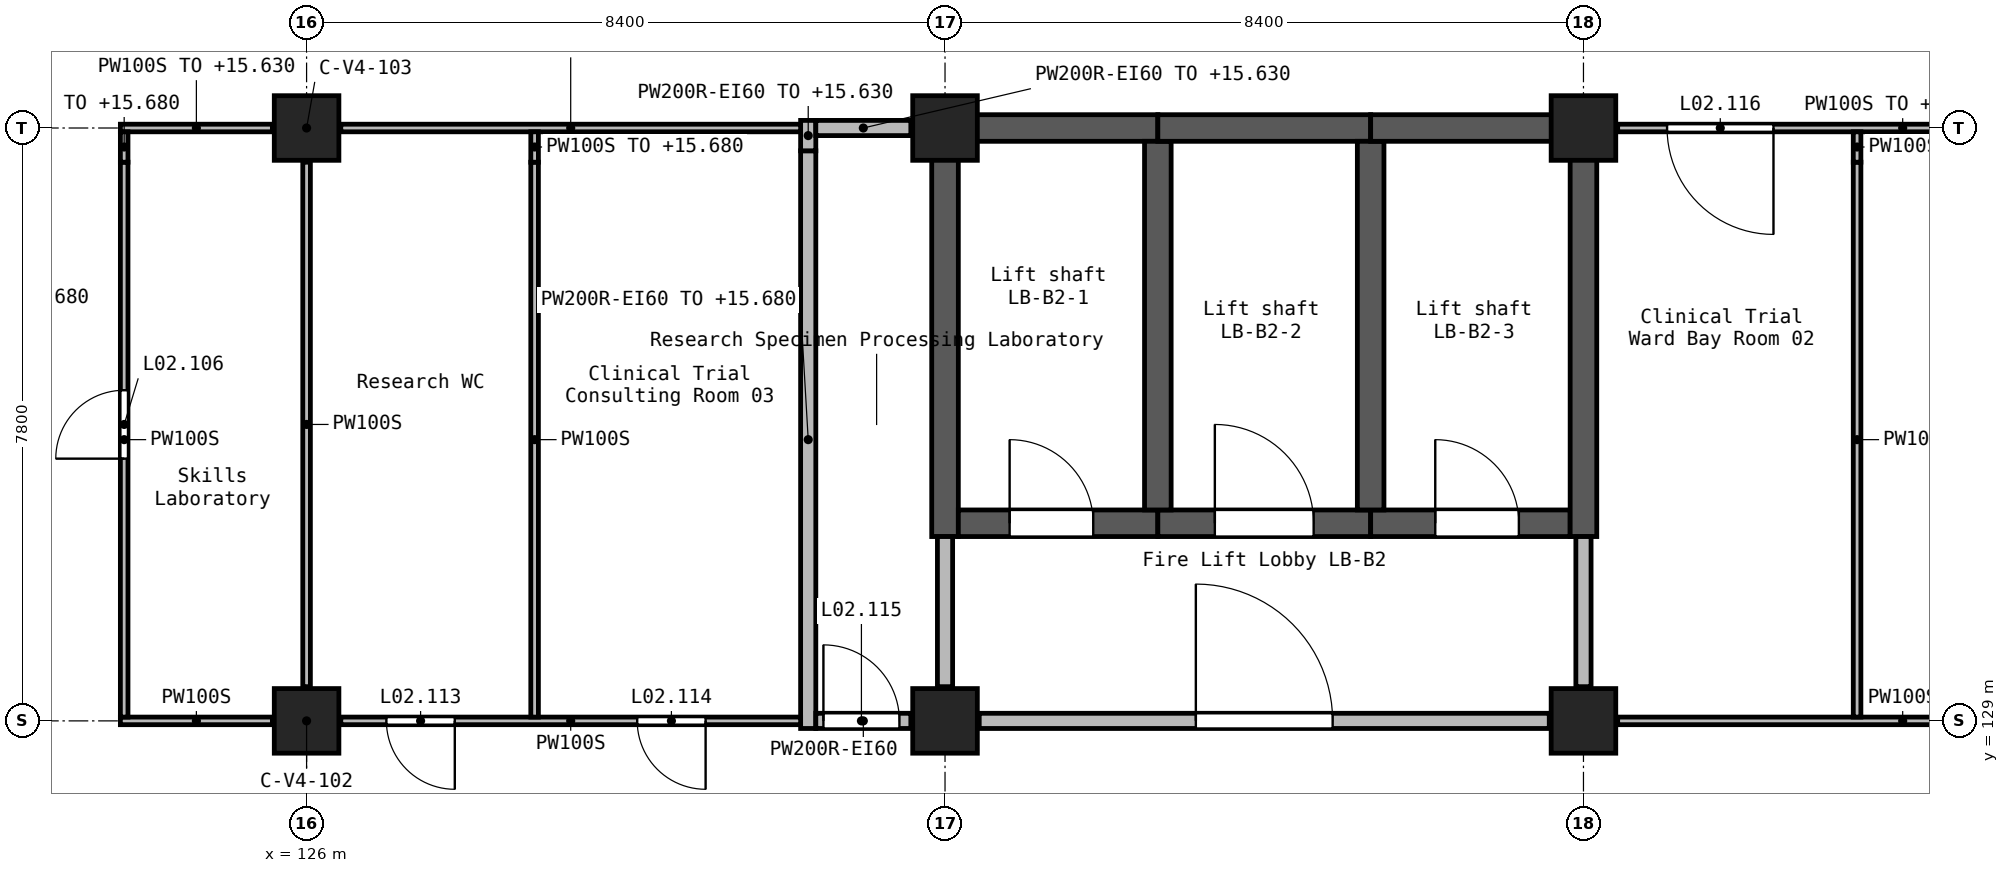
"""IFC4 building model, lengths in metres.
Left out: names, types, materials, properties, quantities, classifications, styles, units other than length and angle.
Written with IfcOpenShell. Run it as: python <this file> out.ifc"""

import sys

from ifc_helpers import new_model, si_unit, direction, frame, frame_2d, origin, origin_2d, place, context, subcontext, project, spatial, rectangle, extrude, element, fill, save


model = new_model("IFC4")
c1 = context("Model", 3, precision=1e-05, world=origin(), true_north=direction((0.0, 1.0)))
c2 = subcontext(c1, "Body", "Model", "MODEL_VIEW")
j1 = project(units=[si_unit("LENGTHUNIT", "METRE"), si_unit("PLANEANGLEUNIT", "RADIAN")], contexts=[c1])
p1 = place(None, origin())
s1 = spatial("IfcSite", under=j1, at=p1, CompositionType="ELEMENT")
p2 = place(p1, origin())
s2 = spatial("IfcBuilding", under=s1, at=p2, CompositionType="ELEMENT")
p3 = place(p2, frame((0.0, 0.0, 12.6)))
s3 = spatial("IfcBuildingStorey", under=s2, at=p3, CompositionType="ELEMENT", Elevation=12.6)
for number, where, z_axis, x_axis in (
    (1, (126.0, 129.0, 0.0), (0.0, 0.0, 1.0), (1.0, 0.0, 0.0)),
    (2, (126.0, 136.8, 0.0), (0.0, 0.0, 1.0), (1.0, 0.0, 0.0)),
    (3, (134.4, 129.0, 0.0), (0.0, 0.0, 1.0), (1.0, 0.0, 0.0)),
    (4, (134.4, 136.8, 0.0), (0.0, 0.0, 1.0), (1.0, 0.0, 0.0)),
    (5, (142.8, 129.0, 0.0), (0.0, 0.0, 1.0), (1.0, 0.0, 0.0)),
    (6, (142.8, 136.8, 0.0), (0.0, 0.0, 1.0), (1.0, 0.0, 0.0)),
):
    element("IfcColumn", number, at=place(p3, frame(where, z_axis=z_axis, x_axis=x_axis)), inside=s3, PredefinedType="COLUMN", context=c2, shape_type="SweptSolid", body=[
        extrude(rectangle(XDim=0.85, YDim=0.85, at=origin_2d()), origin(), (0.0, 0.0, 1.0), 4.2),
    ])
p4 = place(p3, frame((134.225, 136.8, 0.0), z_axis=(0.0, 0.0, 1.0), x_axis=(1.0, 0.0, 0.0)))
e7 = element("IfcWall", 7, at=p4, inside=s3, PredefinedType="SHEAR", context=c2, shape_type="SweptSolid", body=[
    extrude(rectangle(XDim=2.975, YDim=0.35, at=frame_2d((1.487, 0.0))), origin(), (0.0, 0.0, 1.0), 4.2),
])
p5 = place(p3, frame((134.4, 131.425, 0.0), z_axis=(0.0, 0.0, 1.0), x_axis=(0.0, 1.0, 0.0)))
e8 = element("IfcWall", 8, at=p5, inside=s3, PredefinedType="SHEAR", context=c2, shape_type="SweptSolid", body=[
    extrude(rectangle(XDim=5.2, YDim=0.35, at=frame_2d((2.6, 0.0))), origin(), (0.0, 0.0, 1.0), 4.2),
])
p6 = place(p3, frame((134.575, 131.6, 0.0), z_axis=(0.0, 0.0, 1.0), x_axis=(1.0, 0.0, 0.0)))
e9 = element("IfcWall", 9, at=p6, inside=s3, PredefinedType="SHEAR", context=c2, shape_type="SweptSolid", body=[
    extrude(rectangle(XDim=2.625, YDim=0.35, at=frame_2d((1.312, 0.0))), origin(), (0.0, 0.0, 1.0), 4.2),
])
p7 = place(p6, frame((0.675, 0.0, 0.0)))
e10 = element("IfcOpeningElement", 10, at=p7, cuts=e9, PredefinedType="OPENING", context=c2, shape_type="SweptSolid", body=[
    extrude(rectangle(XDim=1.1, YDim=2.1, at=frame_2d((0.55, 1.05))), frame((0.0, 0.185, 0.0), z_axis=(0.0, -1.0, 0.0), x_axis=(1.0, 0.0, 0.0)), (0.0, 0.0, 1.0), 0.37),
])
p8 = place(p3, frame((137.2, 131.6, 0.0), z_axis=(0.0, 0.0, 1.0), x_axis=(1.0, 0.0, 0.0)))
e11 = element("IfcWall", 11, at=p8, inside=s3, PredefinedType="SHEAR", context=c2, shape_type="SweptSolid", body=[
    extrude(rectangle(XDim=2.8, YDim=0.35, at=frame_2d((1.4, 0.0))), origin(), (0.0, 0.0, 1.0), 4.2),
])
p9 = place(p8, frame((0.75, 0.0, 0.0)))
e12 = element("IfcOpeningElement", 12, at=p9, cuts=e11, PredefinedType="OPENING", context=c2, shape_type="SweptSolid", body=[
    extrude(rectangle(XDim=1.3, YDim=2.1, at=frame_2d((0.65, 1.05))), frame((0.0, 0.185, 0.0), z_axis=(0.0, -1.0, 0.0), x_axis=(1.0, 0.0, 0.0)), (0.0, 0.0, 1.0), 0.37),
])
p10 = place(p3, frame((137.2, 131.775, 0.0), z_axis=(0.0, 0.0, 1.0), x_axis=(0.0, 1.0, 0.0)))
e13 = element("IfcWall", 13, at=p10, inside=s3, PredefinedType="SHEAR", context=c2, shape_type="SweptSolid", body=[
    extrude(rectangle(XDim=4.85, YDim=0.35, at=frame_2d((2.425, 0.0))), origin(), (0.0, 0.0, 1.0), 4.2),
])
p11 = place(p3, frame((137.2, 136.8, 0.0), z_axis=(0.0, 0.0, 1.0), x_axis=(1.0, 0.0, 0.0)))
e14 = element("IfcWall", 14, at=p11, inside=s3, PredefinedType="SHEAR", context=c2, shape_type="SweptSolid", body=[
    extrude(rectangle(XDim=2.8, YDim=0.35, at=frame_2d((1.4, 0.0))), origin(), (0.0, 0.0, 1.0), 4.2),
])
p12 = place(p3, frame((140.0, 131.6, 0.0), z_axis=(0.0, 0.0, 1.0), x_axis=(1.0, 0.0, 0.0)))
e15 = element("IfcWall", 15, at=p12, inside=s3, PredefinedType="SHEAR", context=c2, shape_type="SweptSolid", body=[
    extrude(rectangle(XDim=2.625, YDim=0.35, at=frame_2d((1.312, 0.0))), origin(), (0.0, 0.0, 1.0), 4.2),
])
p13 = place(p12, frame((0.85, 0.0, 0.0)))
e16 = element("IfcOpeningElement", 16, at=p13, cuts=e15, PredefinedType="OPENING", context=c2, shape_type="SweptSolid", body=[
    extrude(rectangle(XDim=1.1, YDim=2.1, at=frame_2d((0.55, 1.05))), frame((0.0, 0.185, 0.0), z_axis=(0.0, -1.0, 0.0), x_axis=(1.0, 0.0, 0.0)), (0.0, 0.0, 1.0), 0.37),
])
p14 = place(p3, frame((140.0, 131.775, 0.0), z_axis=(0.0, 0.0, 1.0), x_axis=(0.0, 1.0, 0.0)))
e17 = element("IfcWall", 17, at=p14, inside=s3, PredefinedType="SHEAR", context=c2, shape_type="SweptSolid", body=[
    extrude(rectangle(XDim=4.85, YDim=0.35, at=frame_2d((2.425, 0.0))), origin(), (0.0, 0.0, 1.0), 4.2),
])
p15 = place(p3, frame((140.0, 136.8, 0.0), z_axis=(0.0, 0.0, 1.0), x_axis=(1.0, 0.0, 0.0)))
e18 = element("IfcWall", 18, at=p15, inside=s3, PredefinedType="SHEAR", context=c2, shape_type="SweptSolid", body=[
    extrude(rectangle(XDim=2.625, YDim=0.35, at=frame_2d((1.312, 0.0))), origin(), (0.0, 0.0, 1.0), 4.2),
])
p16 = place(p3, frame((142.8, 131.425, 0.0), z_axis=(0.0, 0.0, 1.0), x_axis=(0.0, 1.0, 0.0)))
e19 = element("IfcWall", 19, at=p16, inside=s3, PredefinedType="SHEAR", context=c2, shape_type="SweptSolid", body=[
    extrude(rectangle(XDim=5.55, YDim=0.35, at=frame_2d((2.775, 0.0))), origin(), (0.0, 0.0, 1.0), 4.2),
])
p17 = place(p3, frame((134.85, 129.0, 0.0), z_axis=(0.0, 0.0, 1.0), x_axis=(1.0, 0.0, 0.0)))
e20 = element("IfcWall", 20, at=p17, inside=s3, PredefinedType="SOLIDWALL", context=c2, shape_type="SweptSolid", body=[
    extrude(rectangle(XDim=7.5, YDim=0.2, at=frame_2d((3.75, 0.0))), origin(), (0.0, 0.0, 1.0), 3.85),
])
p18 = place(p17, frame((2.85, 0.0, 0.0)))
e21 = element("IfcOpeningElement", 21, at=p18, cuts=e20, PredefinedType="OPENING", context=c2, shape_type="SweptSolid", body=[
    extrude(rectangle(XDim=1.8, YDim=2.1, at=frame_2d((0.9, 1.05))), frame((0.0, 0.11, 0.0), z_axis=(0.0, -1.0, 0.0), x_axis=(1.0, 0.0, 0.0)), (0.0, 0.0, 1.0), 0.22),
])
p19 = place(p3, frame((132.6, 128.9, 0.0), z_axis=(0.0, 0.0, 1.0), x_axis=(0.0, 1.0, 0.0)))
e22 = element("IfcWall", 22, at=p19, inside=s3, PredefinedType="SOLIDWALL", context=c2, shape_type="SweptSolid", body=[
    extrude(rectangle(XDim=7.6, YDim=0.2, at=frame_2d((3.8, 0.0))), origin(), (0.0, 0.0, 1.0), 3.08),
])
p20 = place(p3, frame((132.6, 136.5, 0.0), z_axis=(0.0, 0.0, 1.0), x_axis=(0.0, 1.0, 0.0)))
e23 = element("IfcWall", 23, at=p20, inside=s3, PredefinedType="SOLIDWALL", context=c2, shape_type="SweptSolid", body=[
    extrude(rectangle(XDim=0.4, YDim=0.2, at=frame_2d((0.2, 0.0))), origin(), (0.0, 0.0, 1.0), 3.03),
])
for number, where, z_axis, x_axis in (
    (24, (134.4, 129.45, 0.0), (0.0, 0.0, 1.0), (0.0, 1.0, 0.0)),
    (25, (142.8, 129.45, 0.0), (0.0, 0.0, 1.0), (0.0, 1.0, 0.0)),
):
    element("IfcWall", number, at=place(p3, frame(where, z_axis=z_axis, x_axis=x_axis)), inside=s3, PredefinedType="SOLIDWALL", context=c2, shape_type="SweptSolid", body=[
        extrude(rectangle(XDim=1.975, YDim=0.2, at=frame_2d((0.988, 0.0))), origin(), (0.0, 0.0, 1.0), 3.85),
    ])
p21 = place(p3, frame((132.7, 129.0, 0.0), z_axis=(0.0, 0.0, 1.0), x_axis=(1.0, 0.0, 0.0)))
e26 = element("IfcWall", 26, at=p21, inside=s3, PredefinedType="SOLIDWALL", context=c2, shape_type="SweptSolid", body=[
    extrude(rectangle(XDim=1.25, YDim=0.2, at=frame_2d((0.625, 0.0))), origin(), (0.0, 0.0, 1.0), 3.85),
])
p22 = place(p21, frame((0.1, 0.0, 0.0)))
e27 = element("IfcOpeningElement", 27, at=p22, cuts=e26, PredefinedType="OPENING", context=c2, shape_type="SweptSolid", body=[
    extrude(rectangle(XDim=1.0, YDim=2.1, at=frame_2d((0.5, 1.05))), frame((0.0, 0.11, 0.0), z_axis=(0.0, -1.0, 0.0), x_axis=(1.0, 0.0, 0.0)), (0.0, 0.0, 1.0), 0.22),
])
p23 = place(p3, frame((132.7, 136.8, 0.0), z_axis=(0.0, 0.0, 1.0), x_axis=(1.0, 0.0, 0.0)))
e28 = element("IfcWall", 28, at=p23, inside=s3, PredefinedType="SOLIDWALL", context=c2, shape_type="SweptSolid", body=[
    extrude(rectangle(XDim=1.25, YDim=0.2, at=frame_2d((0.625, 0.0))), origin(), (0.0, 0.0, 1.0), 3.03),
])
p24 = place(p3, frame((150.75, 136.8, 0.0), z_axis=(0.0, 0.0, 1.0), x_axis=(-1.0, 0.0, 0.0)))
e29 = element("IfcWall", 29, at=p24, inside=s3, PredefinedType="PARTITIONING", context=c2, shape_type="SweptSolid", body=[
    extrude(rectangle(XDim=7.5, YDim=0.1, at=frame_2d((3.75, 0.0))), origin(), (0.0, 0.0, 1.0), 3.03),
])
p25 = place(p24, frame((5.45, 0.0, 0.0)))
e30 = element("IfcOpeningElement", 30, at=p25, cuts=e29, PredefinedType="OPENING", context=c2, shape_type="SweptSolid", body=[
    extrude(rectangle(XDim=1.4, YDim=2.1, at=frame_2d((0.7, 1.05))), frame((0.0, 0.06, 0.0), z_axis=(0.0, -1.0, 0.0), x_axis=(1.0, 0.0, 0.0)), (0.0, 0.0, 1.0), 0.12),
])
p26 = place(p3, frame((132.5, 129.0, 0.0), z_axis=(0.0, 0.0, 1.0), x_axis=(-1.0, 0.0, 0.0)))
e31 = element("IfcWall", 31, at=p26, inside=s3, PredefinedType="PARTITIONING", context=c2, shape_type="SweptSolid", body=[
    extrude(rectangle(XDim=6.05, YDim=0.1, at=frame_2d((3.025, 0.0))), origin(), (0.0, 0.0, 1.0), 3.85),
])
p27 = place(p26, frame((4.55, 0.0, 0.0)))
e32 = element("IfcOpeningElement", 32, at=p27, cuts=e31, PredefinedType="OPENING", context=c2, shape_type="SweptSolid", body=[
    extrude(rectangle(XDim=0.9, YDim=2.1, at=frame_2d((0.45, 1.05))), frame((0.0, 0.06, 0.0), z_axis=(0.0, -1.0, 0.0), x_axis=(1.0, 0.0, 0.0)), (0.0, 0.0, 1.0), 0.12),
])
p28 = place(p26, frame((1.25, 0.0, 0.0)))
e33 = element("IfcOpeningElement", 33, at=p28, cuts=e31, PredefinedType="OPENING", context=c2, shape_type="SweptSolid", body=[
    extrude(rectangle(XDim=0.9, YDim=2.1, at=frame_2d((0.45, 1.05))), frame((0.0, 0.06, 0.0), z_axis=(0.0, -1.0, 0.0), x_axis=(1.0, 0.0, 0.0)), (0.0, 0.0, 1.0), 0.12),
])
p29 = place(p3, frame((125.55, 129.0, 0.0), z_axis=(0.0, 0.0, 1.0), x_axis=(-1.0, 0.0, 0.0)))
e34 = element("IfcWall", 34, at=p29, inside=s3, PredefinedType="PARTITIONING", context=c2, shape_type="SweptSolid", body=[
    extrude(rectangle(XDim=2.0, YDim=0.1, at=frame_2d((1.0, 0.0))), origin(), (0.0, 0.0, 1.0), 3.85),
])
p30 = place(p3, frame((132.5, 136.8, 0.0), z_axis=(0.0, 0.0, 1.0), x_axis=(-1.0, 0.0, 0.0)))
e35 = element("IfcWall", 35, at=p30, inside=s3, PredefinedType="PARTITIONING", context=c2, shape_type="SweptSolid", body=[
    extrude(rectangle(XDim=6.05, YDim=0.1, at=frame_2d((3.025, 0.0))), origin(), (0.0, 0.0, 1.0), 3.03),
])
p31 = place(p3, frame((125.55, 136.8, 0.0), z_axis=(0.0, 0.0, 1.0), x_axis=(-1.0, 0.0, 0.0)))
e36 = element("IfcWall", 36, at=p31, inside=s3, PredefinedType="PARTITIONING", context=c2, shape_type="SweptSolid", body=[
    extrude(rectangle(XDim=2.0, YDim=0.1, at=frame_2d((1.0, 0.0))), origin(), (0.0, 0.0, 1.0), 3.03),
])
p32 = place(p3, frame((143.25, 129.0, 0.0), z_axis=(0.0, 0.0, 1.0), x_axis=(1.0, 0.0, 0.0)))
e37 = element("IfcWall", 37, at=p32, inside=s3, PredefinedType="PARTITIONING", context=c2, shape_type="SweptSolid", body=[
    extrude(rectangle(XDim=7.5, YDim=0.1, at=frame_2d((3.75, 0.0))), origin(), (0.0, 0.0, 1.0), 3.85),
])
p33 = place(p3, frame((123.6, 129.05, 0.0), z_axis=(0.0, 0.0, 1.0), x_axis=(0.0, 1.0, 0.0)))
e38 = element("IfcWall", 38, at=p33, inside=s3, PredefinedType="PARTITIONING", context=c2, shape_type="SweptSolid", body=[
    extrude(rectangle(XDim=7.3, YDim=0.1, at=frame_2d((3.65, 0.0))), origin(), (0.0, 0.0, 1.0), 3.85),
])
p34 = place(p33, frame((3.4, 0.0, 0.0)))
e39 = element("IfcOpeningElement", 39, at=p34, cuts=e38, PredefinedType="OPENING", context=c2, shape_type="SweptSolid", body=[
    extrude(rectangle(XDim=0.9, YDim=2.1, at=frame_2d((0.45, 1.05))), frame((0.0, 0.06, 0.0), z_axis=(0.0, -1.0, 0.0), x_axis=(1.0, 0.0, 0.0)), (0.0, 0.0, 1.0), 0.12),
])
p35 = place(p3, frame((123.6, 136.35, 0.0), z_axis=(0.0, 0.0, 1.0), x_axis=(0.0, 1.0, 0.0)))
e40 = element("IfcWall", 40, at=p35, inside=s3, PredefinedType="PARTITIONING", context=c2, shape_type="SweptSolid", body=[
    extrude(rectangle(XDim=0.4, YDim=0.1, at=frame_2d((0.2, 0.0))), origin(), (0.0, 0.0, 1.0), 3.08),
])
p36 = place(p3, frame((126.0, 129.45, 0.0), z_axis=(0.0, 0.0, 1.0), x_axis=(0.0, 1.0, 0.0)))
e41 = element("IfcWall", 41, at=p36, inside=s3, PredefinedType="PARTITIONING", context=c2, shape_type="SweptSolid", body=[
    extrude(rectangle(XDim=6.9, YDim=0.1, at=frame_2d((3.45, 0.0))), origin(), (0.0, 0.0, 1.0), 3.85),
])
p37 = place(p3, frame((129.0, 129.05, 0.0), z_axis=(0.0, 0.0, 1.0), x_axis=(0.0, 1.0, 0.0)))
e42 = element("IfcWall", 42, at=p37, inside=s3, PredefinedType="PARTITIONING", context=c2, shape_type="SweptSolid", body=[
    extrude(rectangle(XDim=7.3, YDim=0.1, at=frame_2d((3.65, 0.0))), origin(), (0.0, 0.0, 1.0), 3.85),
])
p38 = place(p3, frame((129.0, 136.35, 0.0), z_axis=(0.0, 0.0, 1.0), x_axis=(0.0, 1.0, 0.0)))
e43 = element("IfcWall", 43, at=p38, inside=s3, PredefinedType="PARTITIONING", context=c2, shape_type="SweptSolid", body=[
    extrude(rectangle(XDim=0.4, YDim=0.1, at=frame_2d((0.2, 0.0))), origin(), (0.0, 0.0, 1.0), 3.08),
])
p39 = place(p3, frame((146.4, 129.05, 0.0), z_axis=(0.0, 0.0, 1.0), x_axis=(0.0, 1.0, 0.0)))
e44 = element("IfcWall", 44, at=p39, inside=s3, PredefinedType="PARTITIONING", context=c2, shape_type="SweptSolid", body=[
    extrude(rectangle(XDim=7.3, YDim=0.1, at=frame_2d((3.65, 0.0))), origin(), (0.0, 0.0, 1.0), 3.85),
])
p40 = place(p3, frame((146.4, 136.35, 0.0), z_axis=(0.0, 0.0, 1.0), x_axis=(0.0, 1.0, 0.0)))
e45 = element("IfcWall", 45, at=p40, inside=s3, PredefinedType="PARTITIONING", context=c2, shape_type="SweptSolid", body=[
    extrude(rectangle(XDim=0.4, YDim=0.1, at=frame_2d((0.2, 0.0))), origin(), (0.0, 0.0, 1.0), 3.08),
])
p41 = place(p18, origin())
e46 = element("IfcDoor", 46, at=p41, inside=s3, OperationType="DOUBLE_DOOR_SINGLE_SWING", PredefinedType="DOOR", context=c2, shape_type="SweptSolid", body=[
    extrude(rectangle(XDim=1.8, YDim=2.1, at=frame_2d((0.9, 1.05))), frame((0.0, 0.025, 0.0), z_axis=(0.0, -1.0, 0.0), x_axis=(1.0, 0.0, 0.0)), (0.0, 0.0, 1.0), 0.05),
])
fill(e21, e46)
p42 = place(p34, frame((0.9, 0.0, 0.0), z_axis=(0.0, 0.0, 1.0), x_axis=(-1.0, 0.0, 0.0)))
e47 = element("IfcDoor", 47, at=p42, inside=s3, OperationType="SINGLE_SWING_LEFT", PredefinedType="DOOR", context=c2, shape_type="SweptSolid", body=[
    extrude(rectangle(XDim=0.9, YDim=2.1, at=frame_2d((0.45, 1.05))), frame((0.0, 0.025, 0.0), z_axis=(0.0, -1.0, 0.0), x_axis=(1.0, 0.0, 0.0)), (0.0, 0.0, 1.0), 0.05),
])
fill(e39, e47)
p43 = place(p27, frame((0.9, 0.0, 0.0), z_axis=(0.0, 0.0, 1.0), x_axis=(-1.0, 0.0, 0.0)))
e48 = element("IfcDoor", 48, at=p43, inside=s3, OperationType="SINGLE_SWING_LEFT", PredefinedType="DOOR", context=c2, shape_type="SweptSolid", body=[
    extrude(rectangle(XDim=0.9, YDim=2.1, at=frame_2d((0.45, 1.05))), frame((0.0, 0.025, 0.0), z_axis=(0.0, -1.0, 0.0), x_axis=(1.0, 0.0, 0.0)), (0.0, 0.0, 1.0), 0.05),
])
fill(e32, e48)
p44 = place(p28, frame((0.9, 0.0, 0.0), z_axis=(0.0, 0.0, 1.0), x_axis=(-1.0, 0.0, 0.0)))
e49 = element("IfcDoor", 49, at=p44, inside=s3, OperationType="SINGLE_SWING_RIGHT", PredefinedType="DOOR", context=c2, shape_type="SweptSolid", body=[
    extrude(rectangle(XDim=0.9, YDim=2.1, at=frame_2d((0.45, 1.05))), frame((0.0, 0.025, 0.0), z_axis=(0.0, -1.0, 0.0), x_axis=(1.0, 0.0, 0.0)), (0.0, 0.0, 1.0), 0.05),
])
fill(e33, e49)
p45 = place(p22, origin())
e50 = element("IfcDoor", 50, at=p45, inside=s3, OperationType="SINGLE_SWING_LEFT", PredefinedType="DOOR", context=c2, shape_type="SweptSolid", body=[
    extrude(rectangle(XDim=1.0, YDim=2.1, at=frame_2d((0.5, 1.05))), frame((0.0, 0.025, 0.0), z_axis=(0.0, -1.0, 0.0), x_axis=(1.0, 0.0, 0.0)), (0.0, 0.0, 1.0), 0.05),
])
fill(e27, e50)
p46 = place(p25, origin())
e51 = element("IfcDoor", 51, at=p46, inside=s3, OperationType="DOUBLE_DOOR_SINGLE_SWING", PredefinedType="DOOR", context=c2, shape_type="SweptSolid", body=[
    extrude(rectangle(XDim=1.4, YDim=2.1, at=frame_2d((0.7, 1.05))), frame((0.0, 0.025, 0.0), z_axis=(0.0, -1.0, 0.0), x_axis=(1.0, 0.0, 0.0)), (0.0, 0.0, 1.0), 0.05),
])
fill(e30, e51)
p47 = place(p7, origin())
e52 = element("IfcDoor", 52, at=p47, inside=s3, OperationType="DOUBLE_DOOR_SLIDING", PredefinedType="DOOR", context=c2, shape_type="SweptSolid", body=[
    extrude(rectangle(XDim=1.1, YDim=2.1, at=frame_2d((0.55, 1.05))), frame((0.0, 0.025, 0.0), z_axis=(0.0, -1.0, 0.0), x_axis=(1.0, 0.0, 0.0)), (0.0, 0.0, 1.0), 0.05),
])
fill(e10, e52)
p48 = place(p9, origin())
e53 = element("IfcDoor", 53, at=p48, inside=s3, OperationType="DOUBLE_DOOR_SLIDING", PredefinedType="DOOR", context=c2, shape_type="SweptSolid", body=[
    extrude(rectangle(XDim=1.3, YDim=2.1, at=frame_2d((0.65, 1.05))), frame((0.0, 0.025, 0.0), z_axis=(0.0, -1.0, 0.0), x_axis=(1.0, 0.0, 0.0)), (0.0, 0.0, 1.0), 0.05),
])
fill(e12, e53)
p49 = place(p13, origin())
e54 = element("IfcDoor", 54, at=p49, inside=s3, OperationType="DOUBLE_DOOR_SLIDING", PredefinedType="DOOR", context=c2, shape_type="SweptSolid", body=[
    extrude(rectangle(XDim=1.1, YDim=2.1, at=frame_2d((0.55, 1.05))), frame((0.0, 0.025, 0.0), z_axis=(0.0, -1.0, 0.0), x_axis=(1.0, 0.0, 0.0)), (0.0, 0.0, 1.0), 0.05),
])
fill(e16, e54)
save(model, sys.argv[1])
